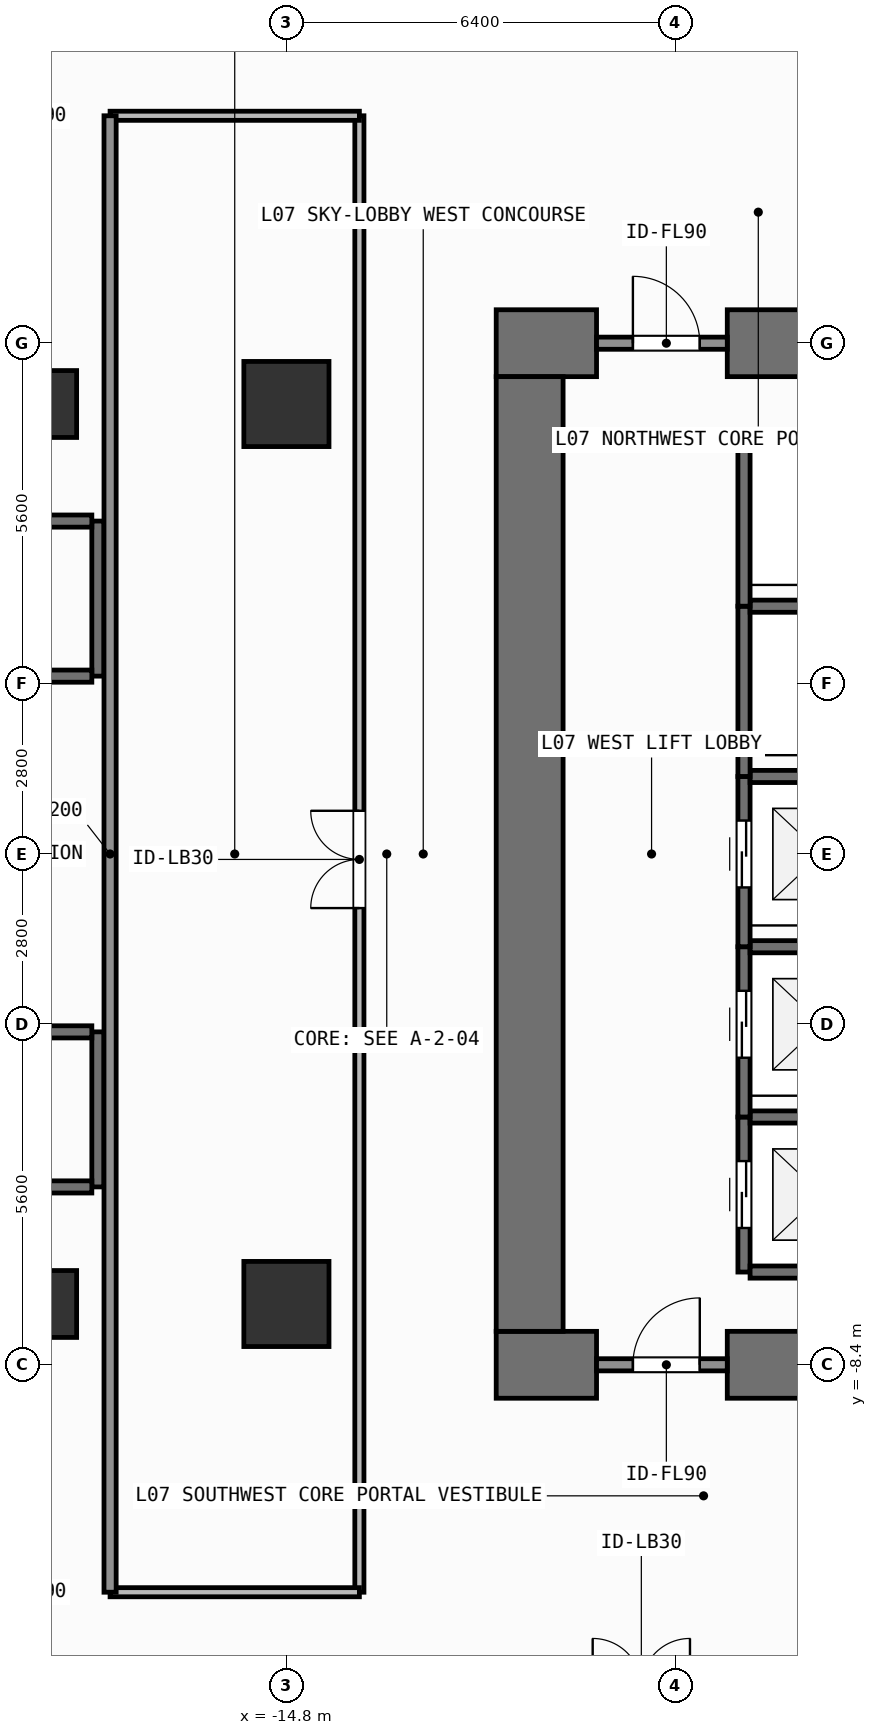
"""IFC4 building model, lengths in metres.
Left out: names, types, materials, properties, quantities, classifications, styles, units other than length and angle.
Written with IfcOpenShell. Run it as: python <this file> out.ifc"""

import sys

from ifc_helpers import new_model, si_unit, direction, frame, frame_2d, origin, origin_2d, place, context, subcontext, project, spatial, rectangle, extrude, element, fill, save


model = new_model("IFC4")
c1 = context("Model", 3, precision=1e-05, world=origin(), true_north=direction((0.0, 1.0)))
c2 = subcontext(c1, "Body", "Model", "MODEL_VIEW")
j1 = project(units=[si_unit("LENGTHUNIT", "METRE"), si_unit("PLANEANGLEUNIT", "RADIAN")], contexts=[c1])
p1 = place(None, origin())
s1 = spatial("IfcSite", under=j1, at=p1, CompositionType="ELEMENT")
p2 = place(p1, origin())
s2 = spatial("IfcBuilding", under=s1, at=p2, CompositionType="ELEMENT")
p3 = place(p2, frame((0.0, 0.0, 26.4)))
s3 = spatial("IfcBuildingStorey", under=s2, at=p3, CompositionType="ELEMENT", Elevation=26.4)
p4 = place(p3, frame((-11.35, -8.4, 0.0), z_axis=(0.0, 0.0, 1.0), x_axis=(1.0, 0.0, 0.0)))
e1 = element("IfcWall", 1, at=p4, inside=s3, PredefinedType="SHEAR", context=c2, shape_type="SweptSolid", body=[
    extrude(rectangle(XDim=1.65, YDim=1.1, at=frame_2d((0.825, 0.0))), origin(), (0.0, 0.0, 1.0), 4.2),
])
p5 = place(p3, frame((-7.55, -8.4, 0.0), z_axis=(0.0, 0.0, 1.0), x_axis=(1.0, 0.0, 0.0)))
e2 = element("IfcWall", 2, at=p5, inside=s3, PredefinedType="SHEAR", context=c2, shape_type="SweptSolid", body=[
    extrude(rectangle(XDim=3.35, YDim=1.1, at=frame_2d((1.675, 0.0))), origin(), (0.0, 0.0, 1.0), 4.2),
])
p6 = place(p3, frame((-11.35, 8.4, 0.0), z_axis=(0.0, 0.0, 1.0), x_axis=(1.0, 0.0, 0.0)))
e3 = element("IfcWall", 3, at=p6, inside=s3, PredefinedType="SHEAR", context=c2, shape_type="SweptSolid", body=[
    extrude(rectangle(XDim=1.65, YDim=1.1, at=frame_2d((0.825, 0.0))), origin(), (0.0, 0.0, 1.0), 4.2),
])
p7 = place(p3, frame((-7.55, 8.4, 0.0), z_axis=(0.0, 0.0, 1.0), x_axis=(1.0, 0.0, 0.0)))
e4 = element("IfcWall", 4, at=p7, inside=s3, PredefinedType="SHEAR", context=c2, shape_type="SweptSolid", body=[
    extrude(rectangle(XDim=16.5, YDim=1.1, at=frame_2d((8.25, 0.0))), origin(), (0.0, 0.0, 1.0), 4.2),
])
p8 = place(p3, frame((-10.8, -7.85, 0.0), z_axis=(0.0, 0.0, 1.0), x_axis=(0.0, 1.0, 0.0)))
e5 = element("IfcWall", 5, at=p8, inside=s3, PredefinedType="SHEAR", context=c2, shape_type="SweptSolid", body=[
    extrude(rectangle(XDim=15.7, YDim=1.1, at=frame_2d((7.85, 0.0))), origin(), (0.0, 0.0, 1.0), 4.2),
])
for number, where, z_axis, x_axis in (
    (6, (-14.8, -7.4, 0.0), (0.0, 0.0, 1.0), (1.0, 0.0, 0.0)),
    (7, (-14.8, 7.4, 0.0), (0.0, 0.0, 1.0), (1.0, 0.0, 0.0)),
):
    element("IfcColumn", number, at=place(p3, frame(where, z_axis=z_axis, x_axis=x_axis)), inside=s3, PredefinedType="COLUMN", context=c2, shape_type="SweptSolid", body=[
        extrude(rectangle(XDim=1.4, YDim=1.4, at=origin_2d()), origin(), (0.0, 0.0, 1.0), 4.2),
    ])
for number, where, z_axis, x_axis in (
    (8, (-18.8, -7.4, 0.0), (0.0, 0.0, 1.0), (1.0, 0.0, 0.0)),
    (9, (-18.8, 7.4, 0.0), (0.0, 0.0, 1.0), (1.0, 0.0, 0.0)),
):
    element("IfcColumn", number, at=place(p3, frame(where, z_axis=z_axis, x_axis=x_axis)), inside=s3, PredefinedType="COLUMN", context=c2, shape_type="SweptSolid", body=[
        extrude(rectangle(XDim=1.1, YDim=1.1, at=origin_2d()), origin(), (0.0, 0.0, 1.0), 4.2),
    ])
p9 = place(p3, frame((-17.9, -5.475, 0.0), z_axis=(0.0, 0.0, 1.0), x_axis=(0.0, 1.0, 0.0)))
e10 = element("IfcWall", 10, at=p9, inside=s3, PredefinedType="SHEAR", context=c2, shape_type="SweptSolid", body=[
    extrude(rectangle(XDim=2.55, YDim=0.2, at=frame_2d((1.275, 0.0))), origin(), (0.0, 0.0, 1.0), 3.98),
])
for number, where, z_axis, x_axis in (
    (11, (-20.4, -5.475, 0.0), (0.0, 0.0, 1.0), (1.0, 0.0, 0.0)),
    (12, (-20.4, -2.925, 0.0), (0.0, 0.0, 1.0), (1.0, 0.0, 0.0)),
):
    element("IfcWall", number, at=place(p3, frame(where, z_axis=z_axis, x_axis=x_axis)), inside=s3, PredefinedType="SHEAR", context=c2, shape_type="SweptSolid", body=[
        extrude(rectangle(XDim=2.4, YDim=0.2, at=frame_2d((1.2, 0.0))), origin(), (0.0, 0.0, 1.0), 3.98),
    ])
p10 = place(p3, frame((-17.9, 2.925, 0.0), z_axis=(0.0, 0.0, 1.0), x_axis=(0.0, 1.0, 0.0)))
e13 = element("IfcWall", 13, at=p10, inside=s3, PredefinedType="SHEAR", context=c2, shape_type="SweptSolid", body=[
    extrude(rectangle(XDim=2.55, YDim=0.2, at=frame_2d((1.275, 0.0))), origin(), (0.0, 0.0, 1.0), 3.98),
])
for number, where, z_axis, x_axis in (
    (14, (-20.4, 2.925, 0.0), (0.0, 0.0, 1.0), (1.0, 0.0, 0.0)),
    (15, (-20.4, 5.475, 0.0), (0.0, 0.0, 1.0), (1.0, 0.0, 0.0)),
):
    element("IfcWall", number, at=place(p3, frame(where, z_axis=z_axis, x_axis=x_axis)), inside=s3, PredefinedType="SHEAR", context=c2, shape_type="SweptSolid", body=[
        extrude(rectangle(XDim=2.4, YDim=0.2, at=frame_2d((1.2, 0.0))), origin(), (0.0, 0.0, 1.0), 3.98),
    ])
p11 = place(p3, frame((-7.275, -6.875, 0.0), z_axis=(0.0, 0.0, 1.0), x_axis=(0.0, 1.0, 0.0)))
e16 = element("IfcWall", 16, at=p11, inside=s3, PredefinedType="SHEAR", context=c2, shape_type="SweptSolid", body=[
    extrude(rectangle(XDim=2.55, YDim=0.2, at=frame_2d((1.275, 0.0))), origin(), (0.0, 0.0, 1.0), 3.98),
])
p12 = place(p11, frame((0.725, 0.0, 0.0)))
e17 = element("IfcOpeningElement", 17, at=p12, cuts=e16, PredefinedType="OPENING", context=c2, shape_type="SweptSolid", body=[
    extrude(rectangle(XDim=1.1, YDim=2.2, at=frame_2d((0.55, 1.1))), frame((0.0, 0.11, 0.0), z_axis=(0.0, -1.0, 0.0), x_axis=(1.0, 0.0, 0.0)), (0.0, 0.0, 1.0), 0.22),
])
for number, where, z_axis, x_axis in (
    (18, (-7.175, -6.875, 0.0), (0.0, 0.0, 1.0), (1.0, 0.0, 0.0)),
    (19, (-7.175, -4.325, 0.0), (0.0, 0.0, 1.0), (1.0, 0.0, 0.0)),
):
    element("IfcWall", number, at=place(p3, frame(where, z_axis=z_axis, x_axis=x_axis)), inside=s3, PredefinedType="SHEAR", context=c2, shape_type="SweptSolid", body=[
        extrude(rectangle(XDim=2.35, YDim=0.2, at=frame_2d((1.175, 0.0))), origin(), (0.0, 0.0, 1.0), 3.98),
    ])
p13 = place(p3, frame((-7.275, -4.325, 0.0), z_axis=(0.0, 0.0, 1.0), x_axis=(0.0, 1.0, 0.0)))
e20 = element("IfcWall", 20, at=p13, inside=s3, PredefinedType="SHEAR", context=c2, shape_type="SweptSolid", body=[
    extrude(rectangle(XDim=2.8, YDim=0.2, at=frame_2d((1.4, 0.0))), origin(), (0.0, 0.0, 1.0), 3.98),
])
p14 = place(p13, frame((0.975, 0.0, 0.0)))
e21 = element("IfcOpeningElement", 21, at=p14, cuts=e20, PredefinedType="OPENING", context=c2, shape_type="SweptSolid", body=[
    extrude(rectangle(XDim=1.1, YDim=2.2, at=frame_2d((0.55, 1.1))), frame((0.0, 0.11, 0.0), z_axis=(0.0, -1.0, 0.0), x_axis=(1.0, 0.0, 0.0)), (0.0, 0.0, 1.0), 0.22),
])
p15 = place(p3, frame((-7.175, -1.525, 0.0), z_axis=(0.0, 0.0, 1.0), x_axis=(1.0, 0.0, 0.0)))
e22 = element("IfcWall", 22, at=p15, inside=s3, PredefinedType="SHEAR", context=c2, shape_type="SweptSolid", body=[
    extrude(rectangle(XDim=2.35, YDim=0.2, at=frame_2d((1.175, 0.0))), origin(), (0.0, 0.0, 1.0), 3.98),
])
p16 = place(p3, frame((-7.275, -1.525, 0.0), z_axis=(0.0, 0.0, 1.0), x_axis=(0.0, 1.0, 0.0)))
e23 = element("IfcWall", 23, at=p16, inside=s3, PredefinedType="SHEAR", context=c2, shape_type="SweptSolid", body=[
    extrude(rectangle(XDim=2.8, YDim=0.2, at=frame_2d((1.4, 0.0))), origin(), (0.0, 0.0, 1.0), 3.98),
])
p17 = place(p16, frame((0.975, 0.0, 0.0)))
e24 = element("IfcOpeningElement", 24, at=p17, cuts=e23, PredefinedType="OPENING", context=c2, shape_type="SweptSolid", body=[
    extrude(rectangle(XDim=1.1, YDim=2.2, at=frame_2d((0.55, 1.1))), frame((0.0, 0.11, 0.0), z_axis=(0.0, -1.0, 0.0), x_axis=(1.0, 0.0, 0.0)), (0.0, 0.0, 1.0), 0.22),
])
p18 = place(p3, frame((-7.175, 1.275, 0.0), z_axis=(0.0, 0.0, 1.0), x_axis=(1.0, 0.0, 0.0)))
e25 = element("IfcWall", 25, at=p18, inside=s3, PredefinedType="SHEAR", context=c2, shape_type="SweptSolid", body=[
    extrude(rectangle(XDim=2.35, YDim=0.2, at=frame_2d((1.175, 0.0))), origin(), (0.0, 0.0, 1.0), 3.98),
])
p19 = place(p3, frame((-7.275, 1.275, 0.0), z_axis=(0.0, 0.0, 1.0), x_axis=(0.0, 1.0, 0.0)))
e26 = element("IfcWall", 26, at=p19, inside=s3, PredefinedType="SHEAR", context=c2, shape_type="SweptSolid", body=[
    extrude(rectangle(XDim=2.8, YDim=0.2, at=frame_2d((1.4, 0.0))), origin(), (0.0, 0.0, 1.0), 3.98),
])
p20 = place(p3, frame((-7.175, 4.075, 0.0), z_axis=(0.0, 0.0, 1.0), x_axis=(1.0, 0.0, 0.0)))
e27 = element("IfcWall", 27, at=p20, inside=s3, PredefinedType="SHEAR", context=c2, shape_type="SweptSolid", body=[
    extrude(rectangle(XDim=2.35, YDim=0.2, at=frame_2d((1.175, 0.0))), origin(), (0.0, 0.0, 1.0), 3.98),
])
p21 = place(p3, frame((-7.275, 4.075, 0.0), z_axis=(0.0, 0.0, 1.0), x_axis=(0.0, 1.0, 0.0)))
e28 = element("IfcWall", 28, at=p21, inside=s3, PredefinedType="SHEAR", context=c2, shape_type="SweptSolid", body=[
    extrude(rectangle(XDim=2.8, YDim=0.2, at=frame_2d((1.4, 0.0))), origin(), (0.0, 0.0, 1.0), 3.98),
])
p22 = place(p3, frame((-7.175, 6.875, 0.0), z_axis=(0.0, 0.0, 1.0), x_axis=(1.0, 0.0, 0.0)))
e29 = element("IfcWall", 29, at=p22, inside=s3, PredefinedType="SHEAR", context=c2, shape_type="SweptSolid", body=[
    extrude(rectangle(XDim=2.35, YDim=0.2, at=frame_2d((1.175, 0.0))), origin(), (0.0, 0.0, 1.0), 3.98),
])
p23 = place(p3, frame((-9.7, -8.4, 0.0), z_axis=(0.0, 0.0, 1.0), x_axis=(1.0, 0.0, 0.0)))
e30 = element("IfcWall", 30, at=p23, inside=s3, PredefinedType="SOLIDWALL", context=c2, shape_type="SweptSolid", body=[
    extrude(rectangle(XDim=2.15, YDim=0.2, at=frame_2d((1.075, 0.0))), origin(), (0.0, 0.0, 1.0), 3.02),
])
p24 = place(p23, frame((0.598, 0.0, 0.0)))
e31 = element("IfcOpeningElement", 31, at=p24, cuts=e30, PredefinedType="OPENING", context=c2, shape_type="SweptSolid", body=[
    extrude(rectangle(XDim=1.1, YDim=2.15, at=frame_2d((0.55, 1.075))), frame((0.0, 0.11, 0.0), z_axis=(0.0, -1.0, 0.0), x_axis=(1.0, 0.0, 0.0)), (0.0, 0.0, 1.0), 0.22),
])
p25 = place(p3, frame((-9.7, 8.4, 0.0), z_axis=(0.0, 0.0, 1.0), x_axis=(1.0, 0.0, 0.0)))
e32 = element("IfcWall", 32, at=p25, inside=s3, PredefinedType="SOLIDWALL", context=c2, shape_type="SweptSolid", body=[
    extrude(rectangle(XDim=2.15, YDim=0.2, at=frame_2d((1.075, 0.0))), origin(), (0.0, 0.0, 1.0), 3.02),
])
p26 = place(p25, frame((0.598, 0.0, 0.0)))
e33 = element("IfcOpeningElement", 33, at=p26, cuts=e32, PredefinedType="OPENING", context=c2, shape_type="SweptSolid", body=[
    extrude(rectangle(XDim=1.1, YDim=2.15, at=frame_2d((0.55, 1.075))), frame((0.0, 0.11, 0.0), z_axis=(0.0, -1.0, 0.0), x_axis=(1.0, 0.0, 0.0)), (0.0, 0.0, 1.0), 0.22),
])
p27 = place(p3, frame((-13.6, -12.14, 0.0), z_axis=(0.0, 0.0, 1.0), x_axis=(0.0, 1.0, 0.0)))
e34 = element("IfcWall", 34, at=p27, inside=s3, PredefinedType="PARTITIONING", context=c2, shape_type="SweptSolid", body=[
    extrude(rectangle(XDim=24.28, YDim=0.15, at=frame_2d((12.14, 0.0))), origin(), (0.0, 0.0, 1.0), 3.98),
])
p28 = place(p27, frame((11.25, 0.0, 0.0)))
e35 = element("IfcOpeningElement", 35, at=p28, cuts=e34, PredefinedType="OPENING", context=c2, shape_type="SweptSolid", body=[
    extrude(rectangle(XDim=1.6, YDim=2.3, at=frame_2d((0.8, 1.15))), frame((0.0, 0.085, 0.0), z_axis=(0.0, -1.0, 0.0), x_axis=(1.0, 0.0, 0.0)), (0.0, 0.0, 1.0), 0.17),
])
for number, where, z_axis, x_axis in (
    (36, (-17.7, -12.14, 0.0), (0.0, 0.0, 1.0), (1.0, 0.0, 0.0)),
    (37, (-17.7, 12.14, 0.0), (0.0, 0.0, 1.0), (1.0, 0.0, 0.0)),
):
    element("IfcWall", number, at=place(p3, frame(where, z_axis=z_axis, x_axis=x_axis)), inside=s3, PredefinedType="PARTITIONING", context=c2, shape_type="SweptSolid", body=[
        extrude(rectangle(XDim=4.1, YDim=0.15, at=frame_2d((2.05, 0.0))), origin(), (0.0, 0.0, 1.0), 3.98),
    ])
p29 = place(p3, frame((-17.7, -12.14, 0.0), z_axis=(0.0, 0.0, 1.0), x_axis=(0.0, 1.0, 0.0)))
e38 = element("IfcWall", 38, at=p29, inside=s3, PredefinedType="SOLIDWALL", context=c2, shape_type="SweptSolid", body=[
    extrude(rectangle(XDim=24.28, YDim=0.2, at=frame_2d((12.14, 0.0))), origin(), (0.0, 0.0, 1.0), 3.98),
])
p30 = place(p12, origin())
e39 = element("IfcDoor", 39, at=p30, inside=s3, OperationType="SLIDING_TO_LEFT", PredefinedType="DOOR", context=c2, shape_type="SweptSolid", body=[
    extrude(rectangle(XDim=1.1, YDim=2.2, at=frame_2d((0.55, 1.1))), frame((0.0, 0.025, 0.0), z_axis=(0.0, -1.0, 0.0), x_axis=(1.0, 0.0, 0.0)), (0.0, 0.0, 1.0), 0.05),
])
fill(e17, e39)
p31 = place(p14, origin())
e40 = element("IfcDoor", 40, at=p31, inside=s3, OperationType="SLIDING_TO_LEFT", PredefinedType="DOOR", context=c2, shape_type="SweptSolid", body=[
    extrude(rectangle(XDim=1.1, YDim=2.2, at=frame_2d((0.55, 1.1))), frame((0.0, 0.025, 0.0), z_axis=(0.0, -1.0, 0.0), x_axis=(1.0, 0.0, 0.0)), (0.0, 0.0, 1.0), 0.05),
])
fill(e21, e40)
p32 = place(p17, origin())
e41 = element("IfcDoor", 41, at=p32, inside=s3, OperationType="SLIDING_TO_LEFT", PredefinedType="DOOR", context=c2, shape_type="SweptSolid", body=[
    extrude(rectangle(XDim=1.1, YDim=2.2, at=frame_2d((0.55, 1.1))), frame((0.0, 0.025, 0.0), z_axis=(0.0, -1.0, 0.0), x_axis=(1.0, 0.0, 0.0)), (0.0, 0.0, 1.0), 0.05),
])
fill(e24, e41)
p33 = place(p24, origin())
e42 = element("IfcDoor", 42, at=p33, inside=s3, OperationType="SINGLE_SWING_RIGHT", PredefinedType="DOOR", context=c2, shape_type="SweptSolid", body=[
    extrude(rectangle(XDim=1.1, YDim=2.15, at=frame_2d((0.55, 1.075))), frame((0.0, 0.025, 0.0), z_axis=(0.0, -1.0, 0.0), x_axis=(1.0, 0.0, 0.0)), (0.0, 0.0, 1.0), 0.05),
])
fill(e31, e42)
p34 = place(p26, origin())
e43 = element("IfcDoor", 43, at=p34, inside=s3, OperationType="SINGLE_SWING_LEFT", PredefinedType="DOOR", context=c2, shape_type="SweptSolid", body=[
    extrude(rectangle(XDim=1.1, YDim=2.15, at=frame_2d((0.55, 1.075))), frame((0.0, 0.025, 0.0), z_axis=(0.0, -1.0, 0.0), x_axis=(1.0, 0.0, 0.0)), (0.0, 0.0, 1.0), 0.05),
])
fill(e33, e43)
p35 = place(p28, origin())
e44 = element("IfcDoor", 44, at=p35, inside=s3, OperationType="SINGLE_SWING_LEFT", PredefinedType="DOOR", context=c2, shape_type="SweptSolid", body=[
    extrude(rectangle(XDim=1.6, YDim=2.3, at=frame_2d((0.8, 1.15))), frame((0.0, 0.025, 0.0), z_axis=(0.0, -1.0, 0.0), x_axis=(1.0, 0.0, 0.0)), (0.0, 0.0, 1.0), 0.05),
])
fill(e35, e44)
save(model, sys.argv[1])
